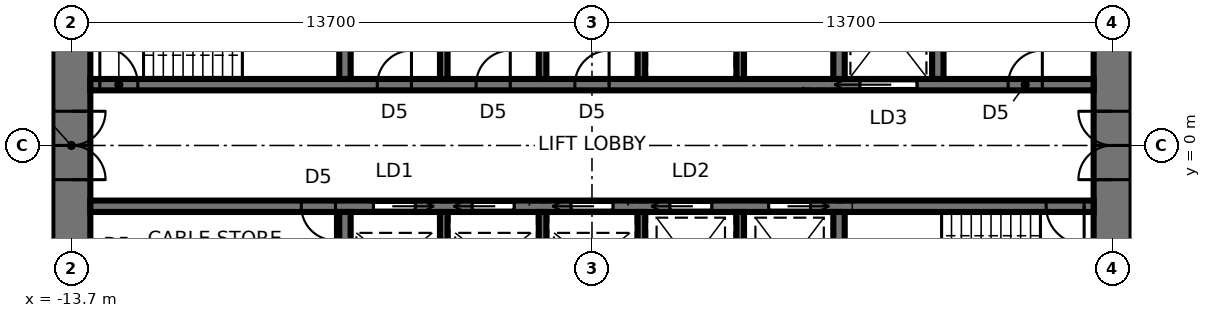
"""IFC4 building model, lengths in metres.
Left out: names, types, materials, properties, quantities, classifications, styles, units other than length and angle.
Written with IfcOpenShell. Run it as: python <this file> out.ifc"""

import sys

from ifc_helpers import new_model, si_unit, direction, frame, frame_2d, origin, place, context, subcontext, project, spatial, rectangle, extrude, element, fill, save


model = new_model("IFC4")
c1 = context("Model", 3, precision=1e-05, world=origin(), true_north=direction((0.0, 1.0)))
c2 = subcontext(c1, "Body", "Model", "MODEL_VIEW")
j1 = project(units=[si_unit("LENGTHUNIT", "METRE"), si_unit("PLANEANGLEUNIT", "RADIAN")], contexts=[c1])
p1 = place(None, origin())
s1 = spatial("IfcSite", under=j1, at=p1, CompositionType="ELEMENT")
p2 = place(p1, origin())
s2 = spatial("IfcBuilding", under=s1, at=p2, CompositionType="ELEMENT")
p3 = place(p2, frame((0.0, 0.0, 108.0)))
s3 = spatial("IfcBuildingStorey", under=s2, at=p3, CompositionType="ELEMENT", Elevation=108.0)
p4 = place(p3, frame((13.7, -9.5, 0.0), z_axis=(0.0, 0.0, 1.0), x_axis=(0.0, 1.0, 0.0)))
e1 = element("IfcWall", 1, at=p4, inside=s3, PredefinedType="SHEAR", context=c2, shape_type="SweptSolid", body=[
    extrude(rectangle(XDim=19.0, YDim=1.0, at=frame_2d((9.5, 0.0))), origin(), (0.0, 0.0, 1.0), 3.9),
])
p5 = place(p4, frame((8.6, 0.0, 0.0)))
e2 = element("IfcOpeningElement", 2, at=p5, cuts=e1, PredefinedType="OPENING", context=c2, shape_type="SweptSolid", body=[
    extrude(rectangle(XDim=1.8, YDim=2.4, at=frame_2d((0.9, 1.2))), frame((0.0, 0.51, 0.0), z_axis=(0.0, -1.0, 0.0), x_axis=(1.0, 0.0, 0.0)), (0.0, 0.0, 1.0), 1.02),
])
p6 = place(p3, frame((-13.7, 9.5, 0.0), z_axis=(0.0, 0.0, 1.0), x_axis=(0.0, -1.0, 0.0)))
e3 = element("IfcWall", 3, at=p6, inside=s3, PredefinedType="SHEAR", context=c2, shape_type="SweptSolid", body=[
    extrude(rectangle(XDim=19.0, YDim=1.0, at=frame_2d((9.5, 0.0))), origin(), (0.0, 0.0, 1.0), 3.9),
])
p7 = place(p6, frame((8.6, 0.0, 0.0)))
e4 = element("IfcOpeningElement", 4, at=p7, cuts=e3, PredefinedType="OPENING", context=c2, shape_type="SweptSolid", body=[
    extrude(rectangle(XDim=1.8, YDim=2.4, at=frame_2d((0.9, 1.2))), frame((0.0, 0.51, 0.0), z_axis=(0.0, -1.0, 0.0), x_axis=(1.0, 0.0, 0.0)), (0.0, 0.0, 1.0), 1.02),
])
p8 = place(p3, frame((-13.2, 1.6, 0.0), z_axis=(0.0, 0.0, 1.0), x_axis=(1.0, 0.0, 0.0)))
e5 = element("IfcWall", 5, at=p8, inside=s3, PredefinedType="SHEAR", context=c2, shape_type="SweptSolid", body=[
    extrude(rectangle(XDim=26.4, YDim=0.3, at=frame_2d((13.2, 0.0))), origin(), (0.0, 0.0, 1.0), 3.9),
])
p9 = place(p8, frame((0.25, 0.0, 0.0)))
e6 = element("IfcOpeningElement", 6, at=p9, cuts=e5, PredefinedType="OPENING", context=c2, shape_type="SweptSolid", body=[
    extrude(rectangle(XDim=1.0, YDim=2.1, at=frame_2d((0.5, 1.05))), frame((0.0, 0.16, 0.0), z_axis=(0.0, -1.0, 0.0), x_axis=(1.0, 0.0, 0.0)), (0.0, 0.0, 1.0), 0.32),
])
p10 = place(p8, frame((20.25, 0.0, 0.0)))
e7 = element("IfcOpeningElement", 7, at=p10, cuts=e5, PredefinedType="OPENING", context=c2, shape_type="SweptSolid", body=[
    extrude(rectangle(XDim=1.5, YDim=2.4, at=frame_2d((0.75, 1.2))), frame((0.0, 0.16, 0.0), z_axis=(0.0, -1.0, 0.0), x_axis=(1.0, 0.0, 0.0)), (0.0, 0.0, 1.0), 0.32),
])
p11 = place(p8, frame((7.55, 0.0, 0.0)))
e8 = element("IfcOpeningElement", 8, at=p11, cuts=e5, PredefinedType="OPENING", context=c2, shape_type="SweptSolid", body=[
    extrude(rectangle(XDim=0.9, YDim=2.1, at=frame_2d((0.45, 1.05))), frame((0.0, 0.16, 0.0), z_axis=(0.0, -1.0, 0.0), x_axis=(1.0, 0.0, 0.0)), (0.0, 0.0, 1.0), 0.32),
])
p12 = place(p8, frame((10.15, 0.0, 0.0)))
e9 = element("IfcOpeningElement", 9, at=p12, cuts=e5, PredefinedType="OPENING", context=c2, shape_type="SweptSolid", body=[
    extrude(rectangle(XDim=0.9, YDim=2.1, at=frame_2d((0.45, 1.05))), frame((0.0, 0.16, 0.0), z_axis=(0.0, -1.0, 0.0), x_axis=(1.0, 0.0, 0.0)), (0.0, 0.0, 1.0), 0.32),
])
p13 = place(p8, frame((12.75, 0.0, 0.0)))
e10 = element("IfcOpeningElement", 10, at=p13, cuts=e5, PredefinedType="OPENING", context=c2, shape_type="SweptSolid", body=[
    extrude(rectangle(XDim=0.9, YDim=2.1, at=frame_2d((0.45, 1.05))), frame((0.0, 0.16, 0.0), z_axis=(0.0, -1.0, 0.0), x_axis=(1.0, 0.0, 0.0)), (0.0, 0.0, 1.0), 0.32),
])
p14 = place(p8, frame((24.15, 0.0, 0.0)))
e11 = element("IfcOpeningElement", 11, at=p14, cuts=e5, PredefinedType="OPENING", context=c2, shape_type="SweptSolid", body=[
    extrude(rectangle(XDim=0.9, YDim=2.1, at=frame_2d((0.45, 1.05))), frame((0.0, 0.16, 0.0), z_axis=(0.0, -1.0, 0.0), x_axis=(1.0, 0.0, 0.0)), (0.0, 0.0, 1.0), 0.32),
])
p15 = place(p3, frame((-13.2, -1.6, 0.0), z_axis=(0.0, 0.0, 1.0), x_axis=(1.0, 0.0, 0.0)))
e12 = element("IfcWall", 12, at=p15, inside=s3, PredefinedType="SHEAR", context=c2, shape_type="SweptSolid", body=[
    extrude(rectangle(XDim=26.4, YDim=0.3, at=frame_2d((13.2, 0.0))), origin(), (0.0, 0.0, 1.0), 3.9),
])
p16 = place(p15, frame((25.15, 0.0, 0.0)))
e13 = element("IfcOpeningElement", 13, at=p16, cuts=e12, PredefinedType="OPENING", context=c2, shape_type="SweptSolid", body=[
    extrude(rectangle(XDim=1.0, YDim=2.1, at=frame_2d((0.5, 1.05))), frame((0.0, 0.16, 0.0), z_axis=(0.0, -1.0, 0.0), x_axis=(1.0, 0.0, 0.0)), (0.0, 0.0, 1.0), 0.32),
])
p17 = place(p15, frame((7.45, 0.0, 0.0)))
e14 = element("IfcOpeningElement", 14, at=p17, cuts=e12, PredefinedType="OPENING", context=c2, shape_type="SweptSolid", body=[
    extrude(rectangle(XDim=1.1, YDim=2.3, at=frame_2d((0.55, 1.15))), frame((0.0, 0.16, 0.0), z_axis=(0.0, -1.0, 0.0), x_axis=(1.0, 0.0, 0.0)), (0.0, 0.0, 1.0), 0.32),
])
p18 = place(p15, frame((10.05, 0.0, 0.0)))
e15 = element("IfcOpeningElement", 15, at=p18, cuts=e12, PredefinedType="OPENING", context=c2, shape_type="SweptSolid", body=[
    extrude(rectangle(XDim=1.1, YDim=2.3, at=frame_2d((0.55, 1.15))), frame((0.0, 0.16, 0.0), z_axis=(0.0, -1.0, 0.0), x_axis=(1.0, 0.0, 0.0)), (0.0, 0.0, 1.0), 0.32),
])
p19 = place(p15, frame((12.65, 0.0, 0.0)))
e16 = element("IfcOpeningElement", 16, at=p19, cuts=e12, PredefinedType="OPENING", context=c2, shape_type="SweptSolid", body=[
    extrude(rectangle(XDim=1.1, YDim=2.3, at=frame_2d((0.55, 1.15))), frame((0.0, 0.16, 0.0), z_axis=(0.0, -1.0, 0.0), x_axis=(1.0, 0.0, 0.0)), (0.0, 0.0, 1.0), 0.32),
])
p20 = place(p15, frame((15.25, 0.0, 0.0)))
e17 = element("IfcOpeningElement", 17, at=p20, cuts=e12, PredefinedType="OPENING", context=c2, shape_type="SweptSolid", body=[
    extrude(rectangle(XDim=1.1, YDim=2.3, at=frame_2d((0.55, 1.15))), frame((0.0, 0.16, 0.0), z_axis=(0.0, -1.0, 0.0), x_axis=(1.0, 0.0, 0.0)), (0.0, 0.0, 1.0), 0.32),
])
p21 = place(p15, frame((17.85, 0.0, 0.0)))
e18 = element("IfcOpeningElement", 18, at=p21, cuts=e12, PredefinedType="OPENING", context=c2, shape_type="SweptSolid", body=[
    extrude(rectangle(XDim=1.1, YDim=2.3, at=frame_2d((0.55, 1.15))), frame((0.0, 0.16, 0.0), z_axis=(0.0, -1.0, 0.0), x_axis=(1.0, 0.0, 0.0)), (0.0, 0.0, 1.0), 0.32),
])
p22 = place(p15, frame((5.55, 0.0, 0.0)))
e19 = element("IfcOpeningElement", 19, at=p22, cuts=e12, PredefinedType="OPENING", context=c2, shape_type="SweptSolid", body=[
    extrude(rectangle(XDim=0.9, YDim=2.1, at=frame_2d((0.45, 1.05))), frame((0.0, 0.16, 0.0), z_axis=(0.0, -1.0, 0.0), x_axis=(1.0, 0.0, 0.0)), (0.0, 0.0, 1.0), 0.32),
])
for number, where, z_axis, x_axis in (
    (20, (-6.5, 1.75, 0.0), (0.0, 0.0, 1.0), (0.0, 1.0, 0.0)),
    (21, (6.5, 1.75, 0.0), (0.0, 0.0, 1.0), (0.0, 1.0, 0.0)),
):
    element("IfcWall", number, at=place(p3, frame(where, z_axis=z_axis, x_axis=x_axis)), inside=s3, PredefinedType="SHEAR", context=c2, shape_type="SweptSolid", body=[
        extrude(rectangle(XDim=2.7, YDim=0.3, at=frame_2d((1.35, 0.0))), origin(), (0.0, 0.0, 1.0), 3.9),
    ])
for number, where, z_axis, x_axis in (
    (22, (-3.9, 1.75, 0.0), (0.0, 0.0, 1.0), (0.0, 1.0, 0.0)),
    (23, (-1.3, 1.75, 0.0), (0.0, 0.0, 1.0), (0.0, 1.0, 0.0)),
    (24, (1.3, 1.75, 0.0), (0.0, 0.0, 1.0), (0.0, 1.0, 0.0)),
    (25, (3.9, 1.75, 0.0), (0.0, 0.0, 1.0), (0.0, 1.0, 0.0)),
):
    element("IfcWall", number, at=place(p3, frame(where, z_axis=z_axis, x_axis=x_axis)), inside=s3, PredefinedType="SHEAR", context=c2, shape_type="SweptSolid", body=[
        extrude(rectangle(XDim=2.7, YDim=0.2, at=frame_2d((1.35, 0.0))), origin(), (0.0, 0.0, 1.0), 3.9),
    ])
for number, where, z_axis, x_axis in (
    (26, (-6.5, -1.75, 0.0), (0.0, 0.0, 1.0), (0.0, -1.0, 0.0)),
    (27, (6.5, -1.75, 0.0), (0.0, 0.0, 1.0), (0.0, -1.0, 0.0)),
):
    element("IfcWall", number, at=place(p3, frame(where, z_axis=z_axis, x_axis=x_axis)), inside=s3, PredefinedType="SHEAR", context=c2, shape_type="SweptSolid", body=[
        extrude(rectangle(XDim=2.7, YDim=0.3, at=frame_2d((1.35, 0.0))), origin(), (0.0, 0.0, 1.0), 3.9),
    ])
for number, where, z_axis, x_axis in (
    (28, (-3.9, -1.75, 0.0), (0.0, 0.0, 1.0), (0.0, -1.0, 0.0)),
    (29, (-1.3, -1.75, 0.0), (0.0, 0.0, 1.0), (0.0, -1.0, 0.0)),
    (30, (1.3, -1.75, 0.0), (0.0, 0.0, 1.0), (0.0, -1.0, 0.0)),
    (31, (3.9, -1.75, 0.0), (0.0, 0.0, 1.0), (0.0, -1.0, 0.0)),
):
    element("IfcWall", number, at=place(p3, frame(where, z_axis=z_axis, x_axis=x_axis)), inside=s3, PredefinedType="SHEAR", context=c2, shape_type="SweptSolid", body=[
        extrude(rectangle(XDim=2.7, YDim=0.2, at=frame_2d((1.35, 0.0))), origin(), (0.0, 0.0, 1.0), 3.9),
    ])
p23 = place(p3, frame((9.1, 1.75, 0.0), z_axis=(0.0, 0.0, 1.0), x_axis=(0.0, 1.0, 0.0)))
e32 = element("IfcWall", 32, at=p23, inside=s3, PredefinedType="SHEAR", context=c2, shape_type="SweptSolid", body=[
    extrude(rectangle(XDim=2.7, YDim=0.3, at=frame_2d((1.35, 0.0))), origin(), (0.0, 0.0, 1.0), 3.9),
])
p24 = place(p7, origin())
e33 = element("IfcDoor", 33, at=p24, inside=s3, OperationType="DOUBLE_DOOR_SINGLE_SWING", PredefinedType="DOOR", context=c2, shape_type="SweptSolid", body=[
    extrude(rectangle(XDim=1.72, YDim=2.36, at=frame_2d((0.9, 1.18))), frame((0.0, 0.025, 0.0), z_axis=(0.0, -1.0, 0.0), x_axis=(1.0, 0.0, 0.0)), (0.0, 0.0, 1.0), 0.05),
    extrude(rectangle(XDim=0.04, YDim=2.4, at=frame_2d((0.02, 1.2))), frame((0.0, 0.25, 0.0), z_axis=(0.0, -1.0, 0.0), x_axis=(1.0, 0.0, 0.0)), (0.0, 0.0, 1.0), 0.5),
    extrude(rectangle(XDim=0.04, YDim=2.4, at=frame_2d((1.78, 1.2))), frame((0.0, 0.25, 0.0), z_axis=(0.0, -1.0, 0.0), x_axis=(1.0, 0.0, 0.0)), (0.0, 0.0, 1.0), 0.5),
    extrude(rectangle(XDim=1.72, YDim=0.04, at=frame_2d((0.9, 2.38))), frame((0.0, 0.25, 0.0), z_axis=(0.0, -1.0, 0.0), x_axis=(1.0, 0.0, 0.0)), (0.0, 0.0, 1.0), 0.5),
])
fill(e4, e33)
p25 = place(p5, origin())
e34 = element("IfcDoor", 34, at=p25, inside=s3, OperationType="DOUBLE_DOOR_SINGLE_SWING", PredefinedType="DOOR", context=c2, shape_type="SweptSolid", body=[
    extrude(rectangle(XDim=1.72, YDim=2.36, at=frame_2d((0.9, 1.18))), frame((0.0, 0.025, 0.0), z_axis=(0.0, -1.0, 0.0), x_axis=(1.0, 0.0, 0.0)), (0.0, 0.0, 1.0), 0.05),
    extrude(rectangle(XDim=0.04, YDim=2.4, at=frame_2d((0.02, 1.2))), frame((0.0, 0.25, 0.0), z_axis=(0.0, -1.0, 0.0), x_axis=(1.0, 0.0, 0.0)), (0.0, 0.0, 1.0), 0.5),
    extrude(rectangle(XDim=0.04, YDim=2.4, at=frame_2d((1.78, 1.2))), frame((0.0, 0.25, 0.0), z_axis=(0.0, -1.0, 0.0), x_axis=(1.0, 0.0, 0.0)), (0.0, 0.0, 1.0), 0.5),
    extrude(rectangle(XDim=1.72, YDim=0.04, at=frame_2d((0.9, 2.38))), frame((0.0, 0.25, 0.0), z_axis=(0.0, -1.0, 0.0), x_axis=(1.0, 0.0, 0.0)), (0.0, 0.0, 1.0), 0.5),
])
fill(e2, e34)
p26 = place(p9, origin())
e35 = element("IfcDoor", 35, at=p26, inside=s3, OperationType="SINGLE_SWING_LEFT", PredefinedType="DOOR", context=c2, shape_type="SweptSolid", body=[
    extrude(rectangle(XDim=1.0, YDim=2.1, at=frame_2d((0.5, 1.05))), frame((0.0, 0.025, 0.0), z_axis=(0.0, -1.0, 0.0), x_axis=(1.0, 0.0, 0.0)), (0.0, 0.0, 1.0), 0.05),
])
fill(e6, e35)
p27 = place(p16, frame((1.0, 0.0, 0.0), z_axis=(0.0, 0.0, 1.0), x_axis=(-1.0, 0.0, 0.0)))
e36 = element("IfcDoor", 36, at=p27, inside=s3, OperationType="SINGLE_SWING_LEFT", PredefinedType="DOOR", context=c2, shape_type="SweptSolid", body=[
    extrude(rectangle(XDim=1.0, YDim=2.1, at=frame_2d((0.5, 1.05))), frame((0.0, 0.025, 0.0), z_axis=(0.0, -1.0, 0.0), x_axis=(1.0, 0.0, 0.0)), (0.0, 0.0, 1.0), 0.05),
])
fill(e13, e36)
p28 = place(p10, origin())
e37 = element("IfcDoor", 37, at=p28, inside=s3, OperationType="SLIDING_TO_LEFT", PredefinedType="DOOR", context=c2, shape_type="SweptSolid", body=[
    extrude(rectangle(XDim=1.5, YDim=2.4, at=frame_2d((0.75, 1.2))), frame((0.0, 0.025, 0.0), z_axis=(0.0, -1.0, 0.0), x_axis=(1.0, 0.0, 0.0)), (0.0, 0.0, 1.0), 0.05),
])
fill(e7, e37)
p29 = place(p11, origin())
e38 = element("IfcDoor", 38, at=p29, inside=s3, OperationType="SINGLE_SWING_RIGHT", PredefinedType="DOOR", context=c2, shape_type="SweptSolid", body=[
    extrude(rectangle(XDim=0.9, YDim=2.1, at=frame_2d((0.45, 1.05))), frame((0.0, 0.025, 0.0), z_axis=(0.0, -1.0, 0.0), x_axis=(1.0, 0.0, 0.0)), (0.0, 0.0, 1.0), 0.05),
])
fill(e8, e38)
p30 = place(p12, origin())
e39 = element("IfcDoor", 39, at=p30, inside=s3, OperationType="SINGLE_SWING_RIGHT", PredefinedType="DOOR", context=c2, shape_type="SweptSolid", body=[
    extrude(rectangle(XDim=0.9, YDim=2.1, at=frame_2d((0.45, 1.05))), frame((0.0, 0.025, 0.0), z_axis=(0.0, -1.0, 0.0), x_axis=(1.0, 0.0, 0.0)), (0.0, 0.0, 1.0), 0.05),
])
fill(e9, e39)
p31 = place(p13, origin())
e40 = element("IfcDoor", 40, at=p31, inside=s3, OperationType="SINGLE_SWING_RIGHT", PredefinedType="DOOR", context=c2, shape_type="SweptSolid", body=[
    extrude(rectangle(XDim=0.9, YDim=2.1, at=frame_2d((0.45, 1.05))), frame((0.0, 0.025, 0.0), z_axis=(0.0, -1.0, 0.0), x_axis=(1.0, 0.0, 0.0)), (0.0, 0.0, 1.0), 0.05),
])
fill(e10, e40)
p32 = place(p17, frame((1.1, 0.0, 0.0), z_axis=(0.0, 0.0, 1.0), x_axis=(-1.0, 0.0, 0.0)))
e41 = element("IfcDoor", 41, at=p32, inside=s3, OperationType="SLIDING_TO_LEFT", PredefinedType="DOOR", context=c2, shape_type="SweptSolid", body=[
    extrude(rectangle(XDim=1.1, YDim=2.3, at=frame_2d((0.55, 1.15))), frame((0.0, 0.025, 0.0), z_axis=(0.0, -1.0, 0.0), x_axis=(1.0, 0.0, 0.0)), (0.0, 0.0, 1.0), 0.05),
])
fill(e14, e41)
p33 = place(p18, frame((1.1, 0.0, 0.0), z_axis=(0.0, 0.0, 1.0), x_axis=(-1.0, 0.0, 0.0)))
e42 = element("IfcDoor", 42, at=p33, inside=s3, OperationType="SLIDING_TO_RIGHT", PredefinedType="DOOR", context=c2, shape_type="SweptSolid", body=[
    extrude(rectangle(XDim=1.1, YDim=2.3, at=frame_2d((0.55, 1.15))), frame((0.0, 0.025, 0.0), z_axis=(0.0, -1.0, 0.0), x_axis=(1.0, 0.0, 0.0)), (0.0, 0.0, 1.0), 0.05),
])
fill(e15, e42)
p34 = place(p19, frame((1.1, 0.0, 0.0), z_axis=(0.0, 0.0, 1.0), x_axis=(-1.0, 0.0, 0.0)))
e43 = element("IfcDoor", 43, at=p34, inside=s3, OperationType="SLIDING_TO_RIGHT", PredefinedType="DOOR", context=c2, shape_type="SweptSolid", body=[
    extrude(rectangle(XDim=1.1, YDim=2.3, at=frame_2d((0.55, 1.15))), frame((0.0, 0.025, 0.0), z_axis=(0.0, -1.0, 0.0), x_axis=(1.0, 0.0, 0.0)), (0.0, 0.0, 1.0), 0.05),
])
fill(e16, e43)
p35 = place(p20, frame((1.1, 0.0, 0.0), z_axis=(0.0, 0.0, 1.0), x_axis=(-1.0, 0.0, 0.0)))
e44 = element("IfcDoor", 44, at=p35, inside=s3, OperationType="SLIDING_TO_RIGHT", PredefinedType="DOOR", context=c2, shape_type="SweptSolid", body=[
    extrude(rectangle(XDim=1.1, YDim=2.3, at=frame_2d((0.55, 1.15))), frame((0.0, 0.025, 0.0), z_axis=(0.0, -1.0, 0.0), x_axis=(1.0, 0.0, 0.0)), (0.0, 0.0, 1.0), 0.05),
])
fill(e17, e44)
p36 = place(p21, frame((1.1, 0.0, 0.0), z_axis=(0.0, 0.0, 1.0), x_axis=(-1.0, 0.0, 0.0)))
e45 = element("IfcDoor", 45, at=p36, inside=s3, OperationType="SLIDING_TO_LEFT", PredefinedType="DOOR", context=c2, shape_type="SweptSolid", body=[
    extrude(rectangle(XDim=1.1, YDim=2.3, at=frame_2d((0.55, 1.15))), frame((0.0, 0.025, 0.0), z_axis=(0.0, -1.0, 0.0), x_axis=(1.0, 0.0, 0.0)), (0.0, 0.0, 1.0), 0.05),
])
fill(e18, e45)
p37 = place(p14, origin())
e46 = element("IfcDoor", 46, at=p37, inside=s3, OperationType="SINGLE_SWING_RIGHT", PredefinedType="DOOR", context=c2, shape_type="SweptSolid", body=[
    extrude(rectangle(XDim=0.9, YDim=2.1, at=frame_2d((0.45, 1.05))), frame((0.0, 0.025, 0.0), z_axis=(0.0, -1.0, 0.0), x_axis=(1.0, 0.0, 0.0)), (0.0, 0.0, 1.0), 0.05),
])
fill(e11, e46)
p38 = place(p22, frame((0.9, 0.0, 0.0), z_axis=(0.0, 0.0, 1.0), x_axis=(-1.0, 0.0, 0.0)))
e47 = element("IfcDoor", 47, at=p38, inside=s3, OperationType="SINGLE_SWING_LEFT", PredefinedType="DOOR", context=c2, shape_type="SweptSolid", body=[
    extrude(rectangle(XDim=0.9, YDim=2.1, at=frame_2d((0.45, 1.05))), frame((0.0, 0.025, 0.0), z_axis=(0.0, -1.0, 0.0), x_axis=(1.0, 0.0, 0.0)), (0.0, 0.0, 1.0), 0.05),
])
fill(e19, e47)
save(model, sys.argv[1])
